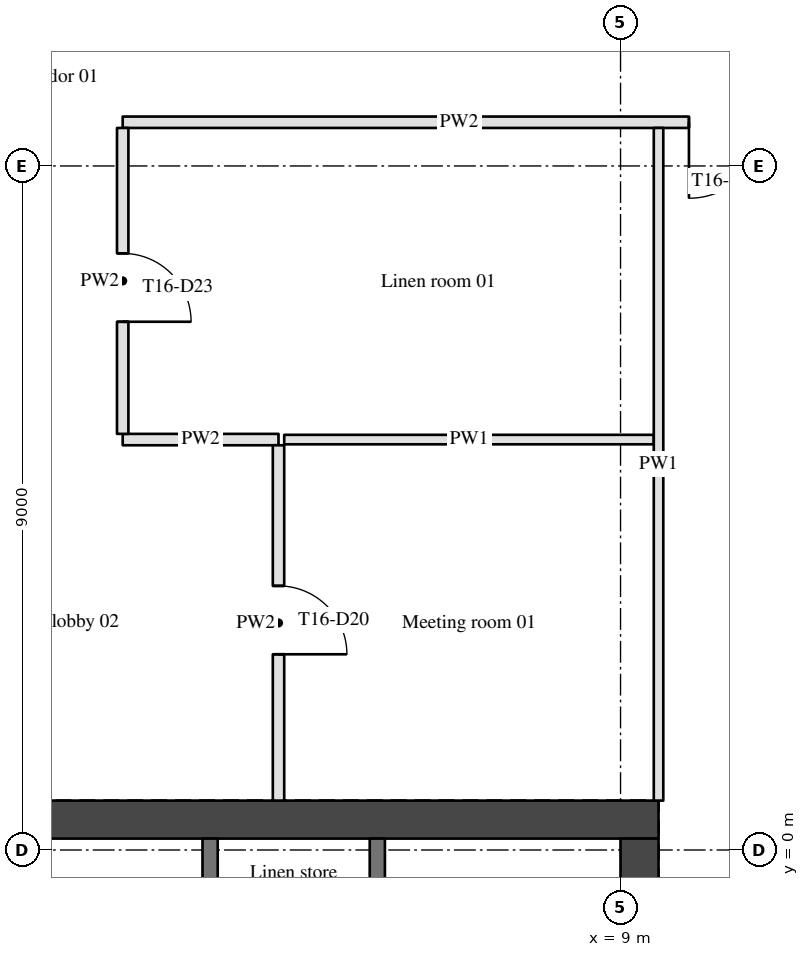
"""IFC4 building model, lengths in metres.
Left out: names, types, materials, properties, quantities, classifications, styles, units other than length and angle.
Written with IfcOpenShell. Run it as: python <this file> out.ifc"""

import sys

from ifc_helpers import new_model, si_unit, direction, frame, frame_2d, origin, place, context, subcontext, project, spatial, rectangle, extrude, element, fill, save


model = new_model("IFC4")
c1 = context("Model", 3, precision=1e-05, world=origin(), true_north=direction((0.0, 1.0)))
c2 = subcontext(c1, "Body", "Model", "MODEL_VIEW")
j1 = project(units=[si_unit("LENGTHUNIT", "METRE"), si_unit("PLANEANGLEUNIT", "RADIAN")], contexts=[c1])
p1 = place(None, origin())
s1 = spatial("IfcSite", under=j1, at=p1, CompositionType="ELEMENT")
p2 = place(p1, origin())
s2 = spatial("IfcBuilding", under=s1, at=p2, CompositionType="ELEMENT")
p3 = place(p2, frame((0.0, 0.0, 217.2)))
s3 = spatial("IfcBuildingStorey", under=s2, at=p3, CompositionType="ELEMENT", Elevation=217.2)
p4 = place(p3, frame((-9.5, 0.4, 0.0), z_axis=(0.0, 0.0, 1.0), x_axis=(1.0, 0.0, 0.0)))
e1 = element("IfcWall", 1, at=p4, inside=s3, PredefinedType="SHEAR", context=c2, shape_type="SweptSolid", body=[
    extrude(rectangle(XDim=19.0, YDim=0.5, at=frame_2d((9.5, 0.0))), origin(), (0.0, 0.0, 1.0), 3.15),
])
p5 = place(p4, frame((8.6, 0.0, 0.0)))
e2 = element("IfcOpeningElement", 2, at=p5, cuts=e1, PredefinedType="OPENING", context=c2, shape_type="SweptSolid", body=[
    extrude(rectangle(XDim=1.8, YDim=2.1, at=frame_2d((0.9, 1.05))), frame((0.0, 0.26, 0.0), z_axis=(0.0, -1.0, 0.0), x_axis=(1.0, 0.0, 0.0)), (0.0, 0.0, 1.0), 0.52),
])
p6 = place(p4, frame((2.55, 0.0, 0.0)))
e3 = element("IfcOpeningElement", 3, at=p6, cuts=e1, PredefinedType="OPENING", context=c2, shape_type="SweptSolid", body=[
    extrude(rectangle(XDim=0.9, YDim=2.1, at=frame_2d((0.45, 1.05))), frame((0.0, 0.26, 0.0), z_axis=(0.0, -1.0, 0.0), x_axis=(1.0, 0.0, 0.0)), (0.0, 0.0, 1.0), 0.52),
])
p7 = place(p3, frame((9.25, -11.5, 0.0), z_axis=(0.0, 0.0, 1.0), x_axis=(0.0, 1.0, 0.0)))
e4 = element("IfcWall", 4, at=p7, inside=s3, PredefinedType="SHEAR", context=c2, shape_type="SweptSolid", body=[
    extrude(rectangle(XDim=11.65, YDim=0.5, at=frame_2d((5.825, 0.0))), origin(), (0.0, 0.0, 1.0), 3.15),
])
p8 = place(p3, frame((2.45, 5.4, 0.0), z_axis=(0.0, 0.0, 1.0), x_axis=(1.0, 0.0, 0.0)))
e5 = element("IfcWall", 5, at=p8, inside=s3, PredefinedType="PARTITIONING", context=c2, shape_type="SweptSolid", body=[
    extrude(rectangle(XDim=2.05, YDim=0.15, at=frame_2d((1.025, 0.0))), origin(), (0.0, 0.0, 1.0), 2.21),
])
p9 = place(p3, frame((4.575, 5.4, 0.0), z_axis=(0.0, 0.0, 1.0), x_axis=(1.0, 0.0, 0.0)))
e6 = element("IfcWall", 6, at=p9, inside=s3, PredefinedType="PARTITIONING", context=c2, shape_type="SweptSolid", body=[
    extrude(rectangle(XDim=4.863, YDim=0.125, at=frame_2d((2.431, 0.0))), origin(), (0.0, 0.0, 1.0), 2.21),
])
p10 = place(p3, frame((11.3, 9.575, 0.0), z_axis=(0.0, 0.0, 1.0), x_axis=(-1.0, 0.0, 0.0)))
e7 = element("IfcWall", 7, at=p10, inside=s3, PredefinedType="PARTITIONING", context=c2, shape_type="SweptSolid", body=[
    extrude(rectangle(XDim=8.85, YDim=0.15, at=frame_2d((4.425, 0.0))), origin(), (0.0, 0.0, 1.0), 2.21),
])
p11 = place(p10, frame((0.4, 0.0, 0.0)))
e8 = element("IfcOpeningElement", 8, at=p11, cuts=e7, PredefinedType="OPENING", context=c2, shape_type="SweptSolid", body=[
    extrude(rectangle(XDim=1.0, YDim=2.1, at=frame_2d((0.5, 1.05))), frame((0.0, 0.085, 0.0), z_axis=(0.0, -1.0, 0.0), x_axis=(1.0, 0.0, 0.0)), (0.0, 0.0, 1.0), 0.17),
])
p12 = place(p3, frame((2.45, 9.5, 0.0), z_axis=(0.0, 0.0, 1.0), x_axis=(0.0, -1.0, 0.0)))
e9 = element("IfcWall", 9, at=p12, inside=s3, PredefinedType="PARTITIONING", context=c2, shape_type="SweptSolid", body=[
    extrude(rectangle(XDim=4.025, YDim=0.15, at=frame_2d((2.012, 0.0))), origin(), (0.0, 0.0, 1.0), 2.21),
])
p13 = place(p12, frame((1.65, 0.0, 0.0)))
e10 = element("IfcOpeningElement", 10, at=p13, cuts=e9, PredefinedType="OPENING", context=c2, shape_type="SweptSolid", body=[
    extrude(rectangle(XDim=0.9, YDim=2.1, at=frame_2d((0.45, 1.05))), frame((0.0, 0.085, 0.0), z_axis=(0.0, -1.0, 0.0), x_axis=(1.0, 0.0, 0.0)), (0.0, 0.0, 1.0), 0.17),
])
p14 = place(p3, frame((3.6, -1.1, 0.0), z_axis=(0.0, 0.0, 1.0), x_axis=(0.0, 1.0, 0.0)))
e11 = element("IfcWall", 11, at=p14, inside=s3, PredefinedType="SOLIDWALL", context=c2, shape_type="SweptSolid", body=[
    extrude(rectangle(XDim=1.25, YDim=0.2, at=frame_2d((0.625, 0.0))), origin(), (0.0, 0.0, 1.0), 2.85),
])
p15 = place(p3, frame((4.5, 5.325, 0.0), z_axis=(0.0, 0.0, 1.0), x_axis=(0.0, -1.0, 0.0)))
e12 = element("IfcWall", 12, at=p15, inside=s3, PredefinedType="PARTITIONING", context=c2, shape_type="SweptSolid", body=[
    extrude(rectangle(XDim=4.675, YDim=0.15, at=frame_2d((2.337, 0.0))), origin(), (0.0, 0.0, 1.0), 2.21),
])
p16 = place(p15, frame((1.85, 0.0, 0.0)))
e13 = element("IfcOpeningElement", 13, at=p16, cuts=e12, PredefinedType="OPENING", context=c2, shape_type="SweptSolid", body=[
    extrude(rectangle(XDim=0.9, YDim=2.1, at=frame_2d((0.45, 1.05))), frame((0.0, 0.085, 0.0), z_axis=(0.0, -1.0, 0.0), x_axis=(1.0, 0.0, 0.0)), (0.0, 0.0, 1.0), 0.17),
])
p17 = place(p3, frame((5.8, -1.1, 0.0), z_axis=(0.0, 0.0, 1.0), x_axis=(0.0, 1.0, 0.0)))
e14 = element("IfcWall", 14, at=p17, inside=s3, PredefinedType="SOLIDWALL", context=c2, shape_type="SweptSolid", body=[
    extrude(rectangle(XDim=1.25, YDim=0.2, at=frame_2d((0.625, 0.0))), origin(), (0.0, 0.0, 1.0), 2.85),
])
p18 = place(p3, frame((9.5, 0.65, 0.0), z_axis=(0.0, 0.0, 1.0), x_axis=(0.0, 1.0, 0.0)))
e15 = element("IfcWall", 15, at=p18, inside=s3, PredefinedType="PARTITIONING", context=c2, shape_type="SweptSolid", body=[
    extrude(rectangle(XDim=8.85, YDim=0.125, at=frame_2d((4.425, 0.0))), origin(), (0.0, 0.0, 1.0), 2.21),
])
p19 = place(p13, origin())
e16 = element("IfcDoor", 16, at=p19, inside=s3, OperationType="SINGLE_SWING_RIGHT", PredefinedType="DOOR", context=c2, shape_type="SweptSolid", body=[
    extrude(rectangle(XDim=0.9, YDim=2.1, at=frame_2d((0.45, 1.05))), frame((0.0, 0.025, 0.0), z_axis=(0.0, -1.0, 0.0), x_axis=(1.0, 0.0, 0.0)), (0.0, 0.0, 1.0), 0.05),
])
fill(e10, e16)
p20 = place(p11, origin())
e17 = element("IfcDoor", 17, at=p20, inside=s3, OperationType="SINGLE_SWING_RIGHT", PredefinedType="DOOR", context=c2, shape_type="SweptSolid", body=[
    extrude(rectangle(XDim=1.0, YDim=2.1, at=frame_2d((0.5, 1.05))), frame((0.0, 0.025, 0.0), z_axis=(0.0, -1.0, 0.0), x_axis=(1.0, 0.0, 0.0)), (0.0, 0.0, 1.0), 0.05),
])
fill(e8, e17)
p21 = place(p16, origin())
e18 = element("IfcDoor", 18, at=p21, inside=s3, OperationType="SINGLE_SWING_RIGHT", PredefinedType="DOOR", context=c2, shape_type="SweptSolid", body=[
    extrude(rectangle(XDim=0.9, YDim=2.1, at=frame_2d((0.45, 1.05))), frame((0.0, 0.025, 0.0), z_axis=(0.0, -1.0, 0.0), x_axis=(1.0, 0.0, 0.0)), (0.0, 0.0, 1.0), 0.05),
])
fill(e13, e18)
save(model, sys.argv[1])
